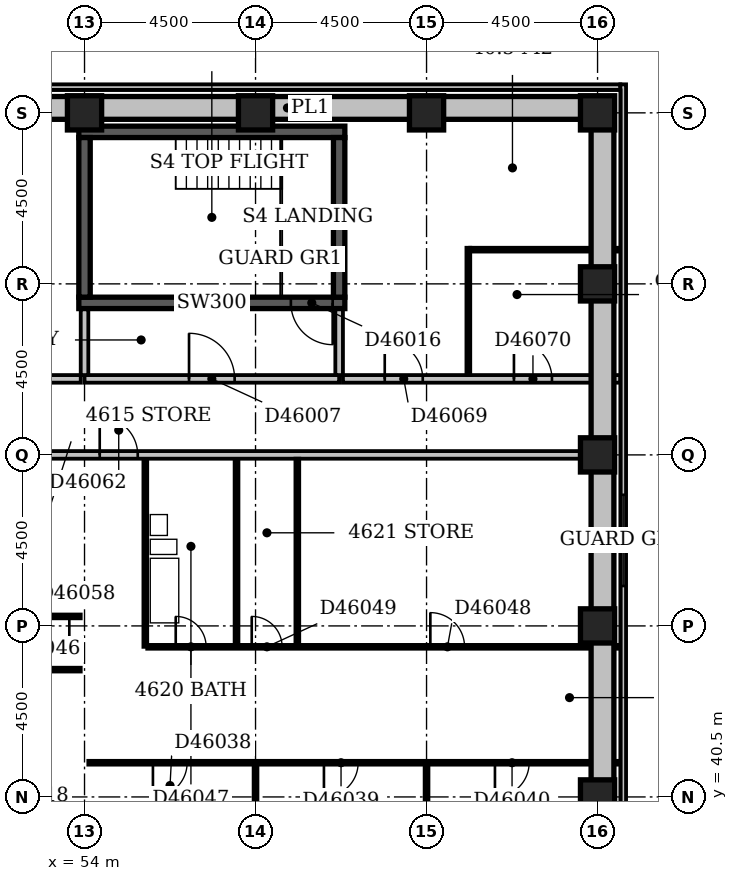
"""IFC4 building model, lengths in metres.
Left out: names, types, materials, properties, quantities, classifications, styles, units other than length and angle.
Written with IfcOpenShell. Run it as: python <this file> out.ifc"""

import sys

from ifc_helpers import new_model, si_unit, direction, frame, frame_2d, origin, origin_2d, place, context, subcontext, project, spatial, rectangle, extrude, element, fill, save


model = new_model("IFC4")
c1 = context("Model", 3, precision=1e-05, world=origin(), true_north=direction((0.0, 1.0)))
c2 = subcontext(c1, "Body", "Model", "MODEL_VIEW")
j1 = project(units=[si_unit("LENGTHUNIT", "METRE"), si_unit("PLANEANGLEUNIT", "RADIAN")], contexts=[c1])
p1 = place(None, origin())
s1 = spatial("IfcSite", under=j1, at=p1, CompositionType="ELEMENT")
p2 = place(p1, origin())
s2 = spatial("IfcBuilding", under=s1, at=p2, CompositionType="ELEMENT")
p3 = place(p2, frame((0.0, 0.0, 182.6)))
s3 = spatial("IfcBuildingStorey", under=s2, at=p3, CompositionType="ELEMENT", Elevation=182.6)
p4 = place(p3, frame((53.85, 53.5, -0.3), z_axis=(0.0, 0.0, 1.0), x_axis=(1.0, 0.0, 0.0)))
e1 = element("IfcWall", 1, at=p4, inside=s3, PredefinedType="SHEAR", context=c2, shape_type="SweptSolid", body=[
    extrude(rectangle(XDim=7.0, YDim=0.3, at=frame_2d((3.5, 0.0))), origin(), (0.0, 0.0, 1.0), 3.55),
])
p5 = place(p4, frame((5.58, 0.0, 0.3)))
e2 = element("IfcOpeningElement", 2, at=p5, cuts=e1, PredefinedType="OPENING", context=c2, shape_type="SweptSolid", body=[
    extrude(rectangle(XDim=1.1, YDim=2.1, at=frame_2d((0.55, 1.05))), frame((0.0, 0.162, 0.0), z_axis=(0.0, -1.0, 0.0), x_axis=(1.0, 0.0, 0.0)), (0.0, 0.0, 1.0), 0.324),
])
p6 = place(p3, frame((53.85, 58.0, -0.3), z_axis=(0.0, 0.0, 1.0), x_axis=(1.0, 0.0, 0.0)))
e3 = element("IfcWall", 3, at=p6, inside=s3, PredefinedType="SHEAR", context=c2, shape_type="SweptSolid", body=[
    extrude(rectangle(XDim=7.0, YDim=0.3, at=frame_2d((3.5, 0.0))), origin(), (0.0, 0.0, 1.0), 3.55),
])
for number, where, z_axis, x_axis in (
    (4, (54.0, 53.65, -0.3), (0.0, 0.0, 1.0), (0.0, 1.0, 0.0)),
    (5, (60.7, 53.65, -0.3), (0.0, 0.0, 1.0), (0.0, 1.0, 0.0)),
):
    element("IfcWall", number, at=place(p3, frame(where, z_axis=z_axis, x_axis=x_axis)), inside=s3, PredefinedType="SHEAR", context=c2, shape_type="SweptSolid", body=[
        extrude(rectangle(XDim=4.2, YDim=0.3, at=frame_2d((2.1, 0.0))), origin(), (0.0, 0.0, 1.0), 3.55),
    ])
for number, where, z_axis, x_axis in (
    (6, (67.5, 40.5, -0.3), (0.0, 0.0, 1.0), (1.0, 0.0, 0.0)),
    (7, (67.5, 45.0, -0.3), (0.0, 0.0, 1.0), (1.0, 0.0, 0.0)),
    (8, (67.5, 49.5, -0.3), (0.0, 0.0, 1.0), (1.0, 0.0, 0.0)),
    (9, (67.5, 54.0, -0.3), (0.0, 0.0, 1.0), (1.0, 0.0, 0.0)),
    (10, (54.0, 58.5, -0.3), (0.0, 0.0, 1.0), (1.0, 0.0, 0.0)),
    (11, (58.5, 58.5, -0.3), (0.0, 0.0, 1.0), (1.0, 0.0, 0.0)),
    (12, (63.0, 58.5, -0.3), (0.0, 0.0, 1.0), (1.0, 0.0, 0.0)),
    (13, (67.5, 58.5, -0.3), (0.0, 0.0, 1.0), (1.0, 0.0, 0.0)),
):
    element("IfcColumn", number, at=place(p3, frame(where, z_axis=z_axis, x_axis=x_axis)), inside=s3, PredefinedType="COLUMN", context=c2, shape_type="SweptSolid", body=[
        extrude(rectangle(XDim=0.9, YDim=0.9, at=origin_2d()), origin(), (0.0, 0.0, 1.0), 3.55),
    ])
p7 = place(p3, frame((68.175, 35.4, 0.0), z_axis=(0.0, 0.0, 1.0), x_axis=(0.0, 1.0, 0.0)))
e14 = element("IfcWall", 14, at=p7, inside=s3, PredefinedType="STANDARD", context=c2, shape_type="SweptSolid", body=[
    extrude(rectangle(XDim=23.85, YDim=0.15, at=frame_2d((11.925, 0.0))), origin(), (0.0, 0.0, 1.0), 2.7),
])
p8 = place(p7, frame((2.311, 0.0, 0.6)))
e15 = element("IfcOpeningElement", 15, at=p8, cuts=e14, PredefinedType="OPENING", context=c2, shape_type="SweptSolid", body=[
    extrude(rectangle(XDim=2.1, YDim=1.8, at=frame_2d((1.05, 0.9))), frame((0.0, 0.087, 0.0), z_axis=(0.0, -1.0, 0.0), x_axis=(1.0, 0.0, 0.0)), (0.0, 0.0, 1.0), 0.174),
])
p9 = place(p7, frame((10.65, 0.0, 0.6)))
e16 = element("IfcOpeningElement", 16, at=p9, cuts=e14, PredefinedType="OPENING", context=c2, shape_type="SweptSolid", body=[
    extrude(rectangle(XDim=2.4, YDim=1.8, at=frame_2d((1.2, 0.9))), frame((0.0, 0.087, 0.0), z_axis=(0.0, -1.0, 0.0), x_axis=(1.0, 0.0, 0.0)), (0.0, 0.0, 1.0), 0.174),
])
p10 = place(p3, frame((68.1, 59.175, 0.0), z_axis=(0.0, 0.0, 1.0), x_axis=(-1.0, 0.0, 0.0)))
e17 = element("IfcWall", 17, at=p10, inside=s3, PredefinedType="STANDARD", context=c2, shape_type="SweptSolid", body=[
    extrude(rectangle(XDim=68.85, YDim=0.15, at=frame_2d((34.425, 0.0))), origin(), (0.0, 0.0, 1.0), 2.7),
])
p11 = place(p3, frame((51.15, 58.63, 3.6), z_axis=(0.0, 0.0, 1.0), x_axis=(1.0, 0.0, 0.0)))
e18 = element("IfcWall", 18, at=p11, inside=s3, PredefinedType="STANDARD", context=c2, shape_type="SweptSolid", body=[
    extrude(rectangle(XDim=16.38, YDim=0.6, at=frame_2d((8.19, 0.0))), origin(), (0.0, 0.0, 1.0), 0.6),
])
p12 = place(p3, frame((67.63, 58.53, 3.6), z_axis=(0.0, 0.0, 1.0), x_axis=(0.0, -1.0, 0.0)))
e19 = element("IfcWall", 19, at=p12, inside=s3, PredefinedType="STANDARD", context=c2, shape_type="SweptSolid", body=[
    extrude(rectangle(XDim=22.56, YDim=0.6, at=frame_2d((11.28, 0.0))), origin(), (0.0, 0.0, 1.0), 0.6),
])
p13 = place(p3, frame((54.0, 51.5, 0.0), z_axis=(0.0, 0.0, 1.0), x_axis=(1.0, 0.0, 0.0)))
e20 = element("IfcWall", 20, at=p13, inside=s3, PredefinedType="PARTITIONING", context=c2, shape_type="SweptSolid", body=[
    extrude(rectangle(XDim=6.7, YDim=0.2, at=frame_2d((3.35, 0.0))), origin(), (0.0, 0.0, 1.0), 3.25),
])
p14 = place(p13, frame((2.75, 0.0, 0.0)))
e21 = element("IfcOpeningElement", 21, at=p14, cuts=e20, PredefinedType="OPENING", context=c2, shape_type="SweptSolid", body=[
    extrude(rectangle(XDim=1.2, YDim=2.1, at=frame_2d((0.6, 1.05))), frame((0.0, 0.112, 0.0), z_axis=(0.0, -1.0, 0.0), x_axis=(1.0, 0.0, 0.0)), (0.0, 0.0, 1.0), 0.224),
])
for number, where, z_axis, x_axis in (
    (22, (60.7, 51.6, 0.0), (0.0, 0.0, 1.0), (0.0, 1.0, 0.0)),
    (23, (54.0, 51.6, 0.0), (0.0, 0.0, 1.0), (0.0, 1.0, 0.0)),
):
    element("IfcWall", number, at=place(p3, frame(where, z_axis=z_axis, x_axis=x_axis)), inside=s3, PredefinedType="PARTITIONING", context=c2, shape_type="SweptSolid", body=[
        extrude(rectangle(XDim=1.73, YDim=0.2, at=frame_2d((0.865, 0.0))), origin(), (0.0, 0.0, 1.0), 3.25),
    ])
p15 = place(p3, frame((58.5, 36.45, 0.0), z_axis=(0.0, 0.0, 1.0), x_axis=(0.0, 1.0, 0.0)))
e24 = element("IfcWall", 24, at=p15, inside=s3, PredefinedType="PARTITIONING", context=c2, shape_type="SweptSolid", body=[
    extrude(rectangle(XDim=4.9, YDim=0.1, at=frame_2d((2.45, 0.0))), origin(), (0.0, 0.0, 1.0), 3.25),
])
p16 = place(p3, frame((63.0, 36.45, 0.0), z_axis=(0.0, 0.0, 1.0), x_axis=(0.0, 1.0, 0.0)))
e25 = element("IfcWall", 25, at=p16, inside=s3, PredefinedType="PARTITIONING", context=c2, shape_type="SweptSolid", body=[
    extrude(rectangle(XDim=4.9, YDim=0.1, at=frame_2d((2.45, 0.0))), origin(), (0.0, 0.0, 1.0), 2.35),
])
p17 = place(p3, frame((54.1, 41.4, 0.0), z_axis=(0.0, 0.0, 1.0), x_axis=(1.0, 0.0, 0.0)))
e26 = element("IfcWall", 26, at=p17, inside=s3, PredefinedType="PARTITIONING", context=c2, shape_type="SweptSolid", body=[
    extrude(rectangle(XDim=14.0, YDim=0.1, at=frame_2d((7.0, 0.0))), origin(), (0.0, 0.0, 1.0), 3.25),
])
p18 = place(p17, frame((1.7, 0.0, 0.0)))
e27 = element("IfcOpeningElement", 27, at=p18, cuts=e26, PredefinedType="OPENING", context=c2, shape_type="SweptSolid", body=[
    extrude(rectangle(XDim=0.9, YDim=2.1, at=frame_2d((0.45, 1.05))), frame((0.0, 0.062, 0.0), z_axis=(0.0, -1.0, 0.0), x_axis=(1.0, 0.0, 0.0)), (0.0, 0.0, 1.0), 0.124),
])
p19 = place(p17, frame((6.2, 0.0, 0.0)))
e28 = element("IfcOpeningElement", 28, at=p19, cuts=e26, PredefinedType="OPENING", context=c2, shape_type="SweptSolid", body=[
    extrude(rectangle(XDim=0.9, YDim=2.1, at=frame_2d((0.45, 1.05))), frame((0.0, 0.062, 0.0), z_axis=(0.0, -1.0, 0.0), x_axis=(1.0, 0.0, 0.0)), (0.0, 0.0, 1.0), 0.124),
])
p20 = place(p17, frame((10.7, 0.0, 0.0)))
e29 = element("IfcOpeningElement", 29, at=p20, cuts=e26, PredefinedType="OPENING", context=c2, shape_type="SweptSolid", body=[
    extrude(rectangle(XDim=0.9, YDim=2.1, at=frame_2d((0.45, 1.05))), frame((0.0, 0.062, 0.0), z_axis=(0.0, -1.0, 0.0), x_axis=(1.0, 0.0, 0.0)), (0.0, 0.0, 1.0), 0.124),
])
p21 = place(p3, frame((40.6, 43.85, 0.0), z_axis=(0.0, 0.0, 1.0), x_axis=(1.0, 0.0, 0.0)))
e30 = element("IfcWall", 30, at=p21, inside=s3, PredefinedType="PARTITIONING", context=c2, shape_type="SweptSolid", body=[
    extrude(rectangle(XDim=13.3, YDim=0.1, at=frame_2d((6.65, 0.0))), origin(), (0.0, 0.0, 1.0), 3.25),
])
p22 = place(p21, frame((1.7, 0.0, 0.0)))
e31 = element("IfcOpeningElement", 31, at=p22, cuts=e30, PredefinedType="OPENING", context=c2, shape_type="SweptSolid", body=[
    extrude(rectangle(XDim=0.9, YDim=2.1, at=frame_2d((0.45, 1.05))), frame((0.0, 0.062, 0.0), z_axis=(0.0, -1.0, 0.0), x_axis=(1.0, 0.0, 0.0)), (0.0, 0.0, 1.0), 0.124),
])
p23 = place(p21, frame((6.2, 0.0, 0.0)))
e32 = element("IfcOpeningElement", 32, at=p23, cuts=e30, PredefinedType="OPENING", context=c2, shape_type="SweptSolid", body=[
    extrude(rectangle(XDim=0.9, YDim=2.1, at=frame_2d((0.45, 1.05))), frame((0.0, 0.062, 0.0), z_axis=(0.0, -1.0, 0.0), x_axis=(1.0, 0.0, 0.0)), (0.0, 0.0, 1.0), 0.124),
])
p24 = place(p21, frame((10.7, 0.0, 0.0)))
e33 = element("IfcOpeningElement", 33, at=p24, cuts=e30, PredefinedType="OPENING", context=c2, shape_type="SweptSolid", body=[
    extrude(rectangle(XDim=0.9, YDim=2.1, at=frame_2d((0.45, 1.05))), frame((0.0, 0.062, 0.0), z_axis=(0.0, -1.0, 0.0), x_axis=(1.0, 0.0, 0.0)), (0.0, 0.0, 1.0), 0.124),
])
p25 = place(p3, frame((55.6, 44.45, 0.0), z_axis=(0.0, 0.0, 1.0), x_axis=(0.0, 1.0, 0.0)))
e34 = element("IfcWall", 34, at=p25, inside=s3, PredefinedType="PLUMBINGWALL", context=c2, shape_type="SweptSolid", body=[
    extrude(rectangle(XDim=4.95, YDim=0.1, at=frame_2d((2.475, 0.0))), origin(), (0.0, 0.0, 1.0), 3.25),
])
p26 = place(p3, frame((55.65, 44.45, 0.0), z_axis=(0.0, 0.0, 1.0), x_axis=(1.0, 0.0, 0.0)))
e35 = element("IfcWall", 35, at=p26, inside=s3, PredefinedType="PARTITIONING", context=c2, shape_type="SweptSolid", body=[
    extrude(rectangle(XDim=12.45, YDim=0.1, at=frame_2d((6.225, 0.0))), origin(), (0.0, 0.0, 1.0), 3.25),
])
p27 = place(p26, frame((0.75, 0.0, 0.0)))
e36 = element("IfcOpeningElement", 36, at=p27, cuts=e35, PredefinedType="OPENING", context=c2, shape_type="SweptSolid", body=[
    extrude(rectangle(XDim=0.8, YDim=2.1, at=frame_2d((0.4, 1.05))), frame((0.0, 0.062, 0.0), z_axis=(0.0, -1.0, 0.0), x_axis=(1.0, 0.0, 0.0)), (0.0, 0.0, 1.0), 0.124),
])
p28 = place(p26, frame((7.45, 0.0, 0.0)))
e37 = element("IfcOpeningElement", 37, at=p28, cuts=e35, PredefinedType="OPENING", context=c2, shape_type="SweptSolid", body=[
    extrude(rectangle(XDim=0.9, YDim=2.1, at=frame_2d((0.45, 1.05))), frame((0.0, 0.062, 0.0), z_axis=(0.0, -1.0, 0.0), x_axis=(1.0, 0.0, 0.0)), (0.0, 0.0, 1.0), 0.124),
])
p29 = place(p26, frame((2.75, 0.0, 0.0)))
e38 = element("IfcOpeningElement", 38, at=p29, cuts=e35, PredefinedType="OPENING", context=c2, shape_type="SweptSolid", body=[
    extrude(rectangle(XDim=0.8, YDim=2.1, at=frame_2d((0.4, 1.05))), frame((0.0, 0.062, 0.0), z_axis=(0.0, -1.0, 0.0), x_axis=(1.0, 0.0, 0.0)), (0.0, 0.0, 1.0), 0.124),
])
p30 = place(p3, frame((58.0, 44.5, 0.0), z_axis=(0.0, 0.0, 1.0), x_axis=(0.0, 1.0, 0.0)))
e39 = element("IfcWall", 39, at=p30, inside=s3, PredefinedType="PLUMBINGWALL", context=c2, shape_type="SweptSolid", body=[
    extrude(rectangle(XDim=4.9, YDim=0.1, at=frame_2d((2.45, 0.0))), origin(), (0.0, 0.0, 1.0), 3.25),
])
p31 = place(p3, frame((59.6, 44.5, 0.0), z_axis=(0.0, 0.0, 1.0), x_axis=(0.0, 1.0, 0.0)))
e40 = element("IfcWall", 40, at=p31, inside=s3, PredefinedType="PARTITIONING", context=c2, shape_type="SweptSolid", body=[
    extrude(rectangle(XDim=4.9, YDim=0.1, at=frame_2d((2.45, 0.0))), origin(), (0.0, 0.0, 1.0), 3.25),
])
p32 = place(p3, frame((50.05, 45.25, 0.0), z_axis=(0.0, 0.0, 1.0), x_axis=(1.0, 0.0, 0.0)))
e41 = element("IfcWall", 41, at=p32, inside=s3, PredefinedType="PARTITIONING", context=c2, shape_type="SweptSolid", body=[
    extrude(rectangle(XDim=3.85, YDim=0.1, at=frame_2d((1.925, 0.0))), origin(), (0.0, 0.0, 1.0), 3.25),
])
p33 = place(p32, frame((0.75, 0.0, 0.0)))
e42 = element("IfcOpeningElement", 42, at=p33, cuts=e41, PredefinedType="OPENING", context=c2, shape_type="SweptSolid", body=[
    extrude(rectangle(XDim=0.8, YDim=2.1, at=frame_2d((0.4, 1.05))), frame((0.0, 0.062, 0.0), z_axis=(0.0, -1.0, 0.0), x_axis=(1.0, 0.0, 0.0)), (0.0, 0.0, 1.0), 0.124),
])
p34 = place(p32, frame((2.75, 0.0, 0.0)))
e43 = element("IfcOpeningElement", 43, at=p34, cuts=e41, PredefinedType="OPENING", context=c2, shape_type="SweptSolid", body=[
    extrude(rectangle(XDim=0.8, YDim=2.1, at=frame_2d((0.4, 1.05))), frame((0.0, 0.062, 0.0), z_axis=(0.0, -1.0, 0.0), x_axis=(1.0, 0.0, 0.0)), (0.0, 0.0, 1.0), 0.124),
])
p35 = place(p3, frame((22.6, 49.5, 0.0), z_axis=(0.0, 0.0, 1.0), x_axis=(1.0, 0.0, 0.0)))
e44 = element("IfcWall", 44, at=p35, inside=s3, PredefinedType="PARTITIONING", context=c2, shape_type="SweptSolid", body=[
    extrude(rectangle(XDim=44.45, YDim=0.2, at=frame_2d((22.225, 0.0))), origin(), (0.0, 0.0, 1.0), 3.25),
])
p36 = place(p35, frame((7.1, 0.0, 0.0)))
e45 = element("IfcOpeningElement", 45, at=p36, cuts=e44, PredefinedType="OPENING", context=c2, shape_type="SweptSolid", body=[
    extrude(rectangle(XDim=1.0, YDim=2.1, at=frame_2d((0.5, 1.05))), frame((0.0, 0.112, 0.0), z_axis=(0.0, -1.0, 0.0), x_axis=(1.0, 0.0, 0.0)), (0.0, 0.0, 1.0), 0.224),
])
p37 = place(p35, frame((26.1, 0.0, 0.0)))
e46 = element("IfcOpeningElement", 46, at=p37, cuts=e44, PredefinedType="OPENING", context=c2, shape_type="SweptSolid", body=[
    extrude(rectangle(XDim=1.0, YDim=2.1, at=frame_2d((0.5, 1.05))), frame((0.0, 0.112, 0.0), z_axis=(0.0, -1.0, 0.0), x_axis=(1.0, 0.0, 0.0)), (0.0, 0.0, 1.0), 0.224),
])
p38 = place(p35, frame((31.8, 0.0, 0.0)))
e47 = element("IfcOpeningElement", 47, at=p38, cuts=e44, PredefinedType="OPENING", context=c2, shape_type="SweptSolid", body=[
    extrude(rectangle(XDim=1.0, YDim=2.1, at=frame_2d((0.5, 1.05))), frame((0.0, 0.112, 0.0), z_axis=(0.0, -1.0, 0.0), x_axis=(1.0, 0.0, 0.0)), (0.0, 0.0, 1.0), 0.224),
])
p39 = place(p3, frame((44.1, 51.5, 0.0), z_axis=(0.0, 0.0, 1.0), x_axis=(1.0, 0.0, 0.0)))
e48 = element("IfcWall", 48, at=p39, inside=s3, PredefinedType="PARTITIONING", context=c2, shape_type="SweptSolid", body=[
    extrude(rectangle(XDim=9.8, YDim=0.2, at=frame_2d((4.9, 0.0))), origin(), (0.0, 0.0, 1.0), 3.25),
])
p40 = place(p39, frame((1.9, 0.0, 0.0)))
e49 = element("IfcOpeningElement", 49, at=p40, cuts=e48, PredefinedType="OPENING", context=c2, shape_type="SweptSolid", body=[
    extrude(rectangle(XDim=1.0, YDim=2.1, at=frame_2d((0.5, 1.05))), frame((0.0, 0.112, 0.0), z_axis=(0.0, -1.0, 0.0), x_axis=(1.0, 0.0, 0.0)), (0.0, 0.0, 1.0), 0.224),
])
p41 = place(p39, frame((6.9, 0.0, 0.0)))
e50 = element("IfcOpeningElement", 50, at=p41, cuts=e48, PredefinedType="OPENING", context=c2, shape_type="SweptSolid", body=[
    extrude(rectangle(XDim=1.0, YDim=2.1, at=frame_2d((0.5, 1.05))), frame((0.0, 0.112, 0.0), z_axis=(0.0, -1.0, 0.0), x_axis=(1.0, 0.0, 0.0)), (0.0, 0.0, 1.0), 0.224),
])
p42 = place(p3, frame((60.8, 51.5, 0.0), z_axis=(0.0, 0.0, 1.0), x_axis=(1.0, 0.0, 0.0)))
e51 = element("IfcWall", 51, at=p42, inside=s3, PredefinedType="PARTITIONING", context=c2, shape_type="SweptSolid", body=[
    extrude(rectangle(XDim=7.3, YDim=0.2, at=frame_2d((3.65, 0.0))), origin(), (0.0, 0.0, 1.0), 3.25),
])
p43 = place(p42, frame((1.1, 0.0, 0.0)))
e52 = element("IfcOpeningElement", 52, at=p43, cuts=e51, PredefinedType="OPENING", context=c2, shape_type="SweptSolid", body=[
    extrude(rectangle(XDim=1.0, YDim=2.1, at=frame_2d((0.5, 1.05))), frame((0.0, 0.112, 0.0), z_axis=(0.0, -1.0, 0.0), x_axis=(1.0, 0.0, 0.0)), (0.0, 0.0, 1.0), 0.224),
])
p44 = place(p42, frame((4.5, 0.0, 0.0)))
e53 = element("IfcOpeningElement", 53, at=p44, cuts=e51, PredefinedType="OPENING", context=c2, shape_type="SweptSolid", body=[
    extrude(rectangle(XDim=1.0, YDim=2.1, at=frame_2d((0.5, 1.05))), frame((0.0, 0.112, 0.0), z_axis=(0.0, -1.0, 0.0), x_axis=(1.0, 0.0, 0.0)), (0.0, 0.0, 1.0), 0.224),
])
p45 = place(p3, frame((64.1, 51.6, 0.0), z_axis=(0.0, 0.0, 1.0), x_axis=(0.0, 1.0, 0.0)))
e54 = element("IfcWall", 54, at=p45, inside=s3, PredefinedType="PARTITIONING", context=c2, shape_type="SweptSolid", body=[
    extrude(rectangle(XDim=3.35, YDim=0.1, at=frame_2d((1.675, 0.0))), origin(), (0.0, 0.0, 1.0), 3.25),
])
p46 = place(p3, frame((64.15, 54.9, 0.0), z_axis=(0.0, 0.0, 1.0), x_axis=(1.0, 0.0, 0.0)))
e55 = element("IfcWall", 55, at=p46, inside=s3, PredefinedType="PARTITIONING", context=c2, shape_type="SweptSolid", body=[
    extrude(rectangle(XDim=3.95, YDim=0.1, at=frame_2d((1.975, 0.0))), origin(), (0.0, 0.0, 1.0), 3.25),
])
p47 = place(p9, origin())
e56 = element("IfcWindow", 56, at=p47, inside=s3, PartitioningType="SINGLE_PANEL", PredefinedType="WINDOW", context=c2, shape_type="SweptSolid", body=[
    extrude(rectangle(XDim=2.4, YDim=1.8, at=frame_2d((1.2, 0.9))), frame((0.0, 0.03, 0.0), z_axis=(0.0, -1.0, 0.0), x_axis=(1.0, 0.0, 0.0)), (0.0, 0.0, 1.0), 0.06),
])
fill(e16, e56)
p48 = place(p14, origin())
e57 = element("IfcDoor", 57, at=p48, inside=s3, OperationType="SINGLE_SWING_LEFT", PredefinedType="DOOR", context=c2, shape_type="SweptSolid", body=[
    extrude(rectangle(XDim=1.2, YDim=2.1, at=frame_2d((0.6, 1.05))), frame((0.0, 0.025, 0.0), z_axis=(0.0, -1.0, 0.0), x_axis=(1.0, 0.0, 0.0)), (0.0, 0.0, 1.0), 0.05),
])
fill(e21, e57)
p49 = place(p5, origin())
e58 = element("IfcDoor", 58, at=p49, inside=s3, OperationType="SINGLE_SWING_RIGHT", PredefinedType="DOOR", context=c2, shape_type="SweptSolid", body=[
    extrude(rectangle(XDim=1.1, YDim=2.1, at=frame_2d((0.55, 1.05))), frame((0.0, 0.025, 0.0), z_axis=(0.0, -1.0, 0.0), x_axis=(1.0, 0.0, 0.0)), (0.0, 0.0, 1.0), 0.05),
])
fill(e2, e58)
p50 = place(p18, frame((0.9, 0.0, 0.0), z_axis=(0.0, 0.0, 1.0), x_axis=(-1.0, 0.0, 0.0)))
e59 = element("IfcDoor", 59, at=p50, inside=s3, OperationType="SINGLE_SWING_RIGHT", PredefinedType="DOOR", context=c2, shape_type="SweptSolid", body=[
    extrude(rectangle(XDim=0.9, YDim=2.1, at=frame_2d((0.45, 1.05))), frame((0.0, 0.025, 0.0), z_axis=(0.0, -1.0, 0.0), x_axis=(1.0, 0.0, 0.0)), (0.0, 0.0, 1.0), 0.05),
])
fill(e27, e59)
p51 = place(p19, frame((0.9, 0.0, 0.0), z_axis=(0.0, 0.0, 1.0), x_axis=(-1.0, 0.0, 0.0)))
e60 = element("IfcDoor", 60, at=p51, inside=s3, OperationType="SINGLE_SWING_RIGHT", PredefinedType="DOOR", context=c2, shape_type="SweptSolid", body=[
    extrude(rectangle(XDim=0.9, YDim=2.1, at=frame_2d((0.45, 1.05))), frame((0.0, 0.025, 0.0), z_axis=(0.0, -1.0, 0.0), x_axis=(1.0, 0.0, 0.0)), (0.0, 0.0, 1.0), 0.05),
])
fill(e28, e60)
p52 = place(p20, frame((0.9, 0.0, 0.0), z_axis=(0.0, 0.0, 1.0), x_axis=(-1.0, 0.0, 0.0)))
e61 = element("IfcDoor", 61, at=p52, inside=s3, OperationType="SINGLE_SWING_RIGHT", PredefinedType="DOOR", context=c2, shape_type="SweptSolid", body=[
    extrude(rectangle(XDim=0.9, YDim=2.1, at=frame_2d((0.45, 1.05))), frame((0.0, 0.025, 0.0), z_axis=(0.0, -1.0, 0.0), x_axis=(1.0, 0.0, 0.0)), (0.0, 0.0, 1.0), 0.05),
])
fill(e29, e61)
p53 = place(p27, origin())
e62 = element("IfcDoor", 62, at=p53, inside=s3, OperationType="SINGLE_SWING_LEFT", PredefinedType="DOOR", context=c2, shape_type="SweptSolid", body=[
    extrude(rectangle(XDim=0.8, YDim=2.1, at=frame_2d((0.4, 1.05))), frame((0.0, 0.025, 0.0), z_axis=(0.0, -1.0, 0.0), x_axis=(1.0, 0.0, 0.0)), (0.0, 0.0, 1.0), 0.05),
])
fill(e36, e62)
p54 = place(p28, origin())
e63 = element("IfcDoor", 63, at=p54, inside=s3, OperationType="SINGLE_SWING_LEFT", PredefinedType="DOOR", context=c2, shape_type="SweptSolid", body=[
    extrude(rectangle(XDim=0.9, YDim=2.1, at=frame_2d((0.45, 1.05))), frame((0.0, 0.025, 0.0), z_axis=(0.0, -1.0, 0.0), x_axis=(1.0, 0.0, 0.0)), (0.0, 0.0, 1.0), 0.05),
])
fill(e37, e63)
p55 = place(p29, origin())
e64 = element("IfcDoor", 64, at=p55, inside=s3, OperationType="SINGLE_SWING_LEFT", PredefinedType="DOOR", context=c2, shape_type="SweptSolid", body=[
    extrude(rectangle(XDim=0.8, YDim=2.1, at=frame_2d((0.4, 1.05))), frame((0.0, 0.025, 0.0), z_axis=(0.0, -1.0, 0.0), x_axis=(1.0, 0.0, 0.0)), (0.0, 0.0, 1.0), 0.05),
])
fill(e38, e64)
p56 = place(p34, origin())
e65 = element("IfcDoor", 65, at=p56, inside=s3, OperationType="SINGLE_SWING_RIGHT", PredefinedType="DOOR", context=c2, shape_type="SweptSolid", body=[
    extrude(rectangle(XDim=0.8, YDim=2.1, at=frame_2d((0.4, 1.05))), frame((0.0, 0.025, 0.0), z_axis=(0.0, -1.0, 0.0), x_axis=(1.0, 0.0, 0.0)), (0.0, 0.0, 1.0), 0.05),
])
fill(e43, e65)
p57 = place(p38, origin())
e66 = element("IfcDoor", 66, at=p57, inside=s3, OperationType="SINGLE_SWING_LEFT", PredefinedType="DOOR", context=c2, shape_type="SweptSolid", body=[
    extrude(rectangle(XDim=1.0, YDim=2.1, at=frame_2d((0.5, 1.05))), frame((0.0, 0.025, 0.0), z_axis=(0.0, -1.0, 0.0), x_axis=(1.0, 0.0, 0.0)), (0.0, 0.0, 1.0), 0.05),
])
fill(e47, e66)
p58 = place(p43, origin())
e67 = element("IfcDoor", 67, at=p58, inside=s3, OperationType="SINGLE_SWING_LEFT", PredefinedType="DOOR", context=c2, shape_type="SweptSolid", body=[
    extrude(rectangle(XDim=1.0, YDim=2.1, at=frame_2d((0.5, 1.05))), frame((0.0, 0.025, 0.0), z_axis=(0.0, -1.0, 0.0), x_axis=(1.0, 0.0, 0.0)), (0.0, 0.0, 1.0), 0.05),
])
fill(e52, e67)
p59 = place(p44, origin())
e68 = element("IfcDoor", 68, at=p59, inside=s3, OperationType="SINGLE_SWING_LEFT", PredefinedType="DOOR", context=c2, shape_type="SweptSolid", body=[
    extrude(rectangle(XDim=1.0, YDim=2.1, at=frame_2d((0.5, 1.05))), frame((0.0, 0.025, 0.0), z_axis=(0.0, -1.0, 0.0), x_axis=(1.0, 0.0, 0.0)), (0.0, 0.0, 1.0), 0.05),
])
fill(e53, e68)
save(model, sys.argv[1])
